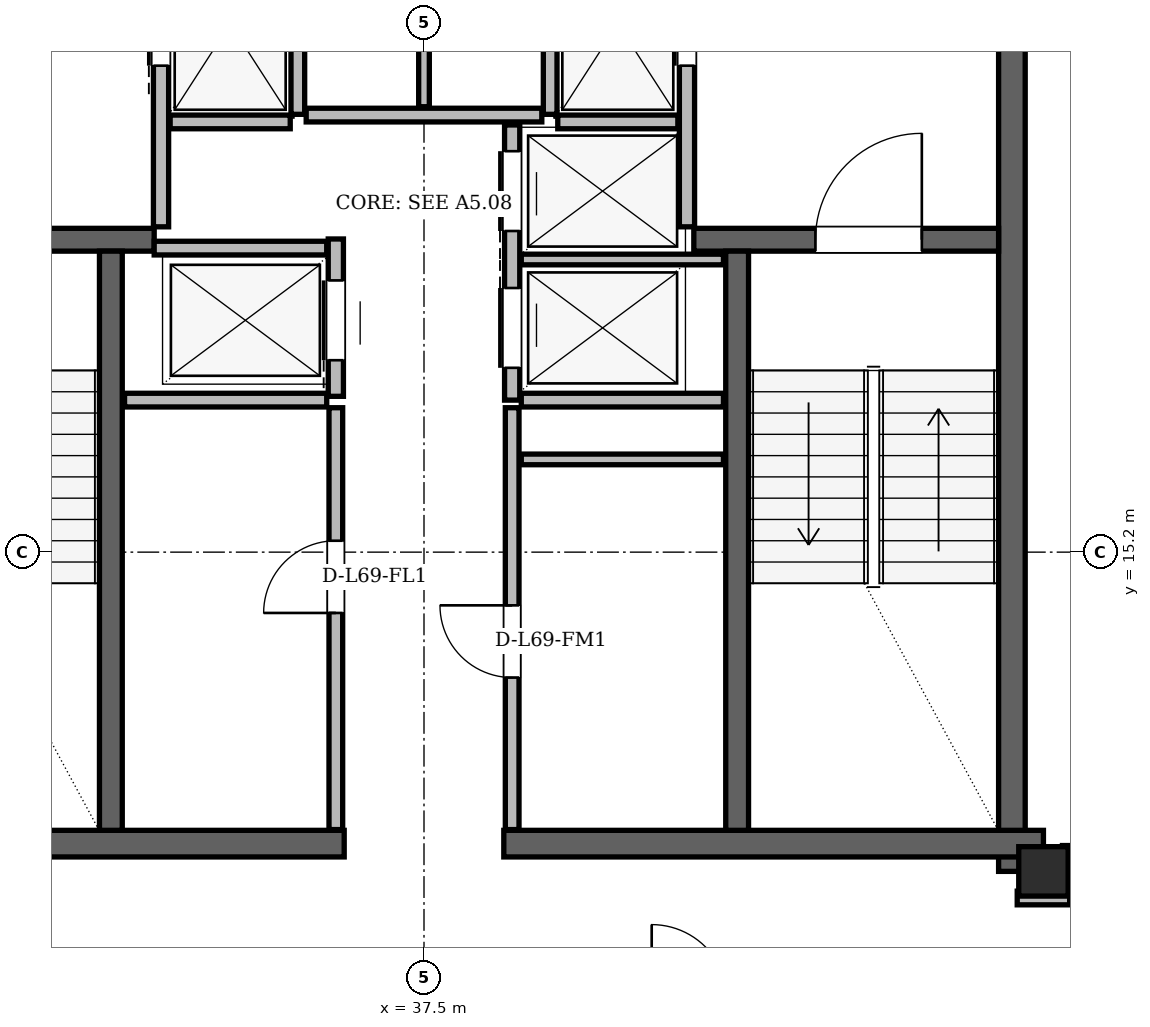
"""IFC4 building model, lengths in metres.
Left out: names, types, materials, properties, quantities, classifications, styles, units other than length and angle.
Written with IfcOpenShell. Run it as: python <this file> out.ifc"""

import sys

from ifc_helpers import new_model, si_unit, direction, frame, frame_2d, origin, origin_2d, place, context, subcontext, project, spatial, rectangle, hollow_rectangle, extrude, element, fill, save


model = new_model("IFC4")
c1 = context("Model", 3, precision=1e-05, world=origin(), true_north=direction((0.0, 1.0)))
c2 = subcontext(c1, "Body", "Model", "MODEL_VIEW")
j1 = project(units=[si_unit("LENGTHUNIT", "METRE"), si_unit("PLANEANGLEUNIT", "RADIAN")], contexts=[c1])
p1 = place(None, origin())
s1 = spatial("IfcSite", under=j1, at=p1, CompositionType="ELEMENT")
p2 = place(p1, origin())
s2 = spatial("IfcBuilding", under=s1, at=p2, CompositionType="ELEMENT")
p3 = place(p2, frame((0.0, 0.0, 261.6)))
s3 = spatial("IfcBuildingStorey", under=s2, at=p3, CompositionType="ELEMENT", Elevation=261.6)
p4 = place(p3, frame((45.65, 11.0, 0.0), z_axis=(0.0, 0.0, 1.0), x_axis=(1.0, 0.0, 0.0)))
e1 = element("IfcColumn", 1, at=p4, inside=s3, PredefinedType="COLUMN", context=c2, shape_type="SweptSolid", body=[
    extrude(hollow_rectangle(XDim=0.65, YDim=0.65, WallThickness=0.05, at=origin_2d()), origin(), (0.0, 0.0, 1.0), 3.9),
])
p5 = place(p3, frame((45.235, 11.0, 0.0), z_axis=(0.0, 0.0, 1.0), x_axis=(0.0, 1.0, 0.0)))
e2 = element("IfcWall", 2, at=p5, inside=s3, PredefinedType="SHEAR", context=c2, shape_type="SweptSolid", body=[
    extrude(rectangle(XDim=13.3, YDim=0.35, at=frame_2d((6.65, 0.0))), origin(), (0.0, 0.0, 1.0), 3.68),
])
for number, where, z_axis, x_axis in (
    (3, (29.35, 11.365, 0.0), (0.0, 0.0, 1.0), (1.0, 0.0, 0.0)),
    (4, (38.55, 11.365, 0.0), (0.0, 0.0, 1.0), (1.0, 0.0, 0.0)),
):
    element("IfcWall", number, at=place(p3, frame(where, z_axis=z_axis, x_axis=x_axis)), inside=s3, PredefinedType="SHEAR", context=c2, shape_type="SweptSolid", body=[
        extrude(rectangle(XDim=7.1, YDim=0.35, at=frame_2d((3.55, 0.0))), origin(), (0.0, 0.0, 1.0), 3.68),
    ])
p6 = place(p3, frame((29.94, 19.31, 0.0), z_axis=(0.0, 0.0, 1.0), x_axis=(1.0, 0.0, 0.0)))
e5 = element("IfcWall", 5, at=p6, inside=s3, PredefinedType="SHEAR", context=c2, shape_type="SweptSolid", body=[
    extrude(rectangle(XDim=4.01, YDim=0.3, at=frame_2d((2.005, 0.0))), origin(), (0.0, 0.0, 1.0), 3.68),
])
p7 = place(p6, frame((1.01, 0.0, 0.0)))
e6 = element("IfcOpeningElement", 6, at=p7, cuts=e5, PredefinedType="OPENING", context=c2, shape_type="SweptSolid", body=[
    extrude(rectangle(XDim=1.4, YDim=2.2, at=frame_2d((0.7, 1.1))), frame((0.0, 0.15, 0.0), z_axis=(0.0, -1.0, 0.0), x_axis=(1.0, 0.0, 0.0)), (0.0, 0.0, 1.0), 0.3),
])
p8 = place(p3, frame((41.05, 19.31, 0.0), z_axis=(0.0, 0.0, 1.0), x_axis=(1.0, 0.0, 0.0)))
e7 = element("IfcWall", 7, at=p8, inside=s3, PredefinedType="SHEAR", context=c2, shape_type="SweptSolid", body=[
    extrude(rectangle(XDim=4.01, YDim=0.3, at=frame_2d((2.005, 0.0))), origin(), (0.0, 0.0, 1.0), 3.68),
])
p9 = place(p8, frame((1.6, 0.0, 0.0)))
e8 = element("IfcOpeningElement", 8, at=p9, cuts=e7, PredefinedType="OPENING", context=c2, shape_type="SweptSolid", body=[
    extrude(rectangle(XDim=1.4, YDim=2.2, at=frame_2d((0.7, 1.1))), frame((0.0, 0.15, 0.0), z_axis=(0.0, -1.0, 0.0), x_axis=(1.0, 0.0, 0.0)), (0.0, 0.0, 1.0), 0.3),
])
for number, where, z_axis, x_axis in (
    (9, (33.38, 11.54, 0.0), (0.0, 0.0, 1.0), (0.0, 1.0, 0.0)),
    (10, (41.62, 11.54, 0.0), (0.0, 0.0, 1.0), (0.0, 1.0, 0.0)),
):
    element("IfcWall", number, at=place(p3, frame(where, z_axis=z_axis, x_axis=x_axis)), inside=s3, PredefinedType="SHEAR", context=c2, shape_type="SweptSolid", body=[
        extrude(rectangle(XDim=7.62, YDim=0.3, at=frame_2d((3.81, 0.0))), origin(), (0.0, 0.0, 1.0), 3.68),
    ])
p10 = place(p3, frame((58.652, 10.835, 0.0), z_axis=(0.0, 0.0, 1.0), x_axis=(-0.500002906693, 0.866023725598, 0.0)))
e11 = element("IfcWall", 11, at=p10, inside=s3, PredefinedType="SOLIDWALL", context=c2, shape_type="SweptSolid", body=[
    extrude(rectangle(XDim=37.2, YDim=0.29, at=frame_2d((18.6, 0.0))), origin(), (0.0, 0.0, 1.0), 3.058),
])
p11 = place(p10, frame((6.774, 0.0, 0.0)))
e12 = element("IfcOpeningElement", 12, at=p11, cuts=e11, PredefinedType="OPENING", context=c2, shape_type="SweptSolid", body=[
    extrude(rectangle(XDim=1.5, YDim=2.2, at=frame_2d((0.75, 1.1))), frame((0.0, 0.145, 0.0), z_axis=(0.0, -1.0, 0.0), x_axis=(1.0, 0.0, 0.0)), (0.0, 0.0, 1.0), 0.29),
])
p12 = place(p10, frame((32.061, 0.0, 0.0)))
e13 = element("IfcOpeningElement", 13, at=p12, cuts=e11, PredefinedType="OPENING", context=c2, shape_type="SweptSolid", body=[
    extrude(rectangle(XDim=1.5, YDim=2.2, at=frame_2d((0.75, 1.1))), frame((0.0, 0.145, 0.0), z_axis=(0.0, -1.0, 0.0), x_axis=(1.0, 0.0, 0.0)), (0.0, 0.0, 1.0), 0.29),
])
p13 = place(p10, frame((12.689, 0.0, 0.85)))
e14 = element("IfcOpeningElement", 14, at=p13, cuts=e11, PredefinedType="OPENING", context=c2, shape_type="SweptSolid", body=[
    extrude(rectangle(XDim=1.6, YDim=1.7, at=frame_2d((0.8, 0.85))), frame((0.0, 0.145, 0.0), z_axis=(0.0, -1.0, 0.0), x_axis=(1.0, 0.0, 0.0)), (0.0, 0.0, 1.0), 0.29),
])
p14 = place(p10, frame((16.599, 0.0, 0.85)))
e15 = element("IfcOpeningElement", 15, at=p14, cuts=e11, PredefinedType="OPENING", context=c2, shape_type="SweptSolid", body=[
    extrude(rectangle(XDim=3.0, YDim=2.098, at=frame_2d((1.5, 1.049))), frame((0.0, 0.145, 0.0), z_axis=(0.0, -1.0, 0.0), x_axis=(1.0, 0.0, 0.0)), (0.0, 0.0, 1.0), 0.29),
])
p15 = place(p10, frame((1.24, 0.0, 0.85)))
e16 = element("IfcOpeningElement", 16, at=p15, cuts=e11, PredefinedType="OPENING", context=c2, shape_type="SweptSolid", body=[
    extrude(rectangle(XDim=1.2, YDim=1.48, at=frame_2d((0.6, 0.74))), frame((0.0, 0.145, 0.0), z_axis=(0.0, -1.0, 0.0), x_axis=(1.0, 0.0, 0.0)), (0.0, 0.0, 1.0), 0.29),
])
p16 = place(p10, frame((3.566, 0.0, 0.85)))
e17 = element("IfcOpeningElement", 17, at=p16, cuts=e11, PredefinedType="OPENING", context=c2, shape_type="SweptSolid", body=[
    extrude(rectangle(XDim=1.2, YDim=1.48, at=frame_2d((0.6, 0.74))), frame((0.0, 0.145, 0.0), z_axis=(0.0, -1.0, 0.0), x_axis=(1.0, 0.0, 0.0)), (0.0, 0.0, 1.0), 0.29),
])
p17 = place(p10, frame((22.917, 0.0, 0.85)))
e18 = element("IfcOpeningElement", 18, at=p17, cuts=e11, PredefinedType="OPENING", context=c2, shape_type="SweptSolid", body=[
    extrude(rectangle(XDim=1.6, YDim=1.7, at=frame_2d((0.8, 0.85))), frame((0.0, 0.145, 0.0), z_axis=(0.0, -1.0, 0.0), x_axis=(1.0, 0.0, 0.0)), (0.0, 0.0, 1.0), 0.29),
])
p18 = place(p10, frame((27.025, 0.0, 0.85)))
e19 = element("IfcOpeningElement", 19, at=p18, cuts=e11, PredefinedType="OPENING", context=c2, shape_type="SweptSolid", body=[
    extrude(rectangle(XDim=3.0, YDim=2.098, at=frame_2d((1.5, 1.049))), frame((0.0, 0.145, 0.0), z_axis=(0.0, -1.0, 0.0), x_axis=(1.0, 0.0, 0.0)), (0.0, 0.0, 1.0), 0.29),
])
p19 = place(p10, frame((34.508, 0.0, 0.85)))
e20 = element("IfcOpeningElement", 20, at=p19, cuts=e11, PredefinedType="OPENING", context=c2, shape_type="SweptSolid", body=[
    extrude(rectangle(XDim=1.2, YDim=1.48, at=frame_2d((0.6, 0.74))), frame((0.0, 0.145, 0.0), z_axis=(0.0, -1.0, 0.0), x_axis=(1.0, 0.0, 0.0)), (0.0, 0.0, 1.0), 0.29),
])
p20 = place(p3, frame((34.948, 43.051, 0.0), z_axis=(0.0, 0.0, 1.0), x_axis=(-0.500002906693, -0.866023725598, 0.0)))
e21 = element("IfcWall", 21, at=p20, inside=s3, PredefinedType="SOLIDWALL", context=c2, shape_type="SweptSolid", body=[
    extrude(rectangle(XDim=37.2, YDim=0.29, at=frame_2d((18.6, 0.0))), origin(), (0.0, 0.0, 1.0), 3.058),
])
p21 = place(p20, frame((8.034, 0.0, 0.0)))
e22 = element("IfcOpeningElement", 22, at=p21, cuts=e21, PredefinedType="OPENING", context=c2, shape_type="SweptSolid", body=[
    extrude(rectangle(XDim=1.5, YDim=2.2, at=frame_2d((0.75, 1.1))), frame((0.0, 0.145, 0.0), z_axis=(0.0, -1.0, 0.0), x_axis=(1.0, 0.0, 0.0)), (0.0, 0.0, 1.0), 0.29),
])
p22 = place(p20, frame((32.061, 0.0, 0.0)))
e23 = element("IfcOpeningElement", 23, at=p22, cuts=e21, PredefinedType="OPENING", context=c2, shape_type="SweptSolid", body=[
    extrude(rectangle(XDim=1.5, YDim=2.2, at=frame_2d((0.75, 1.1))), frame((0.0, 0.145, 0.0), z_axis=(0.0, -1.0, 0.0), x_axis=(1.0, 0.0, 0.0)), (0.0, 0.0, 1.0), 0.29),
])
p23 = place(p20, frame((35.104, 0.0, 0.85)))
e24 = element("IfcOpeningElement", 24, at=p23, cuts=e21, PredefinedType="OPENING", context=c2, shape_type="SweptSolid", body=[
    extrude(rectangle(XDim=1.2, YDim=1.48, at=frame_2d((0.6, 0.74))), frame((0.0, 0.145, 0.0), z_axis=(0.0, -1.0, 0.0), x_axis=(1.0, 0.0, 0.0)), (0.0, 0.0, 1.0), 0.29),
])
p24 = place(p20, frame((12.597, 0.0, 0.85)))
e25 = element("IfcOpeningElement", 25, at=p24, cuts=e21, PredefinedType="OPENING", context=c2, shape_type="SweptSolid", body=[
    extrude(rectangle(XDim=2.0, YDim=1.8, at=frame_2d((1.0, 0.9))), frame((0.0, 0.145, 0.0), z_axis=(0.0, -1.0, 0.0), x_axis=(1.0, 0.0, 0.0)), (0.0, 0.0, 1.0), 0.29),
])
p25 = place(p20, frame((20.995, 0.0, 0.85)))
e26 = element("IfcOpeningElement", 26, at=p25, cuts=e21, PredefinedType="OPENING", context=c2, shape_type="SweptSolid", body=[
    extrude(rectangle(XDim=1.4, YDim=1.6, at=frame_2d((0.7, 0.8))), frame((0.0, 0.145, 0.0), z_axis=(0.0, -1.0, 0.0), x_axis=(1.0, 0.0, 0.0)), (0.0, 0.0, 1.0), 0.29),
])
p26 = place(p20, frame((27.454, 0.0, 0.85)))
e27 = element("IfcOpeningElement", 27, at=p26, cuts=e21, PredefinedType="OPENING", context=c2, shape_type="SweptSolid", body=[
    extrude(rectangle(XDim=1.2, YDim=1.48, at=frame_2d((0.6, 0.74))), frame((0.0, 0.145, 0.0), z_axis=(0.0, -1.0, 0.0), x_axis=(1.0, 0.0, 0.0)), (0.0, 0.0, 1.0), 0.29),
])
p27 = place(p20, frame((2.415, 0.0, 0.85)))
e28 = element("IfcOpeningElement", 28, at=p27, cuts=e21, PredefinedType="OPENING", context=c2, shape_type="SweptSolid", body=[
    extrude(rectangle(XDim=2.6, YDim=1.95, at=frame_2d((1.3, 0.975))), frame((0.0, 0.145, 0.0), z_axis=(0.0, -1.0, 0.0), x_axis=(1.0, 0.0, 0.0)), (0.0, 0.0, 1.0), 0.29),
])
p28 = place(p3, frame((34.04, 19.48, 0.0), z_axis=(0.0, 0.0, 1.0), x_axis=(0.0, 1.0, 0.0)))
e29 = element("IfcWall", 29, at=p28, inside=s3, PredefinedType="PARTITIONING", context=c2, shape_type="SweptSolid", body=[
    extrude(rectangle(XDim=4.5, YDim=0.2, at=frame_2d((2.25, 0.0))), origin(), (0.0, 0.0, 1.0), 3.68),
])
p29 = place(p28, frame((2.12, 0.0, 0.0)))
e30 = element("IfcOpeningElement", 30, at=p29, cuts=e29, PredefinedType="OPENING", context=c2, shape_type="SweptSolid", body=[
    extrude(rectangle(XDim=1.1, YDim=2.2, at=frame_2d((0.55, 1.1))), frame((0.0, 0.1, 0.0), z_axis=(0.0, -1.0, 0.0), x_axis=(1.0, 0.0, 0.0)), (0.0, 0.0, 1.0), 0.2),
])
p30 = place(p3, frame((35.84, 20.96, 0.0), z_axis=(0.0, 0.0, 1.0), x_axis=(0.0, 1.0, 0.0)))
e31 = element("IfcWall", 31, at=p30, inside=s3, PredefinedType="PARTITIONING", context=c2, shape_type="SweptSolid", body=[
    extrude(rectangle(XDim=3.02, YDim=0.18, at=frame_2d((1.51, 0.0))), origin(), (0.0, 0.0, 1.0), 3.68),
])
p31 = place(p3, frame((34.16, 20.86, 0.0), z_axis=(0.0, 0.0, 1.0), x_axis=(1.0, 0.0, 0.0)))
e32 = element("IfcWall", 32, at=p31, inside=s3, PredefinedType="PARTITIONING", context=c2, shape_type="SweptSolid", body=[
    extrude(rectangle(XDim=1.58, YDim=0.18, at=frame_2d((0.79, 0.0))), origin(), (0.0, 0.0, 1.0), 3.68),
])
p32 = place(p3, frame((40.96, 19.48, 0.0), z_axis=(0.0, 0.0, 1.0), x_axis=(0.0, 1.0, 0.0)))
e33 = element("IfcWall", 33, at=p32, inside=s3, PredefinedType="PARTITIONING", context=c2, shape_type="SweptSolid", body=[
    extrude(rectangle(XDim=4.5, YDim=0.2, at=frame_2d((2.25, 0.0))), origin(), (0.0, 0.0, 1.0), 3.68),
])
p33 = place(p32, frame((2.12, 0.0, 0.0)))
e34 = element("IfcOpeningElement", 34, at=p33, cuts=e33, PredefinedType="OPENING", context=c2, shape_type="SweptSolid", body=[
    extrude(rectangle(XDim=1.1, YDim=2.2, at=frame_2d((0.55, 1.1))), frame((0.0, 0.1, 0.0), z_axis=(0.0, -1.0, 0.0), x_axis=(1.0, 0.0, 0.0)), (0.0, 0.0, 1.0), 0.2),
])
p34 = place(p3, frame((39.16, 20.96, 0.0), z_axis=(0.0, 0.0, 1.0), x_axis=(0.0, 1.0, 0.0)))
e35 = element("IfcWall", 35, at=p34, inside=s3, PredefinedType="PARTITIONING", context=c2, shape_type="SweptSolid", body=[
    extrude(rectangle(XDim=3.02, YDim=0.18, at=frame_2d((1.51, 0.0))), origin(), (0.0, 0.0, 1.0), 3.68),
])
p35 = place(p3, frame((39.26, 20.86, 0.0), z_axis=(0.0, 0.0, 1.0), x_axis=(1.0, 0.0, 0.0)))
e36 = element("IfcWall", 36, at=p35, inside=s3, PredefinedType="PARTITIONING", context=c2, shape_type="SweptSolid", body=[
    extrude(rectangle(XDim=1.58, YDim=0.18, at=frame_2d((0.79, 0.0))), origin(), (0.0, 0.0, 1.0), 3.68),
])
p36 = place(p3, frame((36.34, 17.25, 0.0), z_axis=(0.0, 0.0, 1.0), x_axis=(0.0, 1.0, 0.0)))
e37 = element("IfcWall", 37, at=p36, inside=s3, PredefinedType="PARTITIONING", context=c2, shape_type="SweptSolid", body=[
    extrude(rectangle(XDim=2.07, YDim=0.2, at=frame_2d((1.035, 0.0))), origin(), (0.0, 0.0, 1.0), 3.68),
])
p37 = place(p36, frame((0.475, 0.0, 0.0)))
e38 = element("IfcOpeningElement", 38, at=p37, cuts=e37, PredefinedType="OPENING", context=c2, shape_type="SweptSolid", body=[
    extrude(rectangle(XDim=1.05, YDim=2.15, at=frame_2d((0.525, 1.075))), frame((0.0, 0.1, 0.0), z_axis=(0.0, -1.0, 0.0), x_axis=(1.0, 0.0, 0.0)), (0.0, 0.0, 1.0), 0.2),
])
p38 = place(p3, frame((33.95, 19.2, 0.0), z_axis=(0.0, 0.0, 1.0), x_axis=(1.0, 0.0, 0.0)))
e39 = element("IfcWall", 39, at=p38, inside=s3, PredefinedType="PARTITIONING", context=c2, shape_type="SweptSolid", body=[
    extrude(rectangle(XDim=2.27, YDim=0.18, at=frame_2d((1.135, 0.0))), origin(), (0.0, 0.0, 1.0), 3.68),
])
p39 = place(p3, frame((33.56, 17.2, 0.0), z_axis=(0.0, 0.0, 1.0), x_axis=(1.0, 0.0, 0.0)))
e40 = element("IfcWall", 40, at=p39, inside=s3, PredefinedType="PARTITIONING", context=c2, shape_type="SweptSolid", body=[
    extrude(rectangle(XDim=2.66, YDim=0.18, at=frame_2d((1.33, 0.0))), origin(), (0.0, 0.0, 1.0), 3.68),
])
p40 = place(p3, frame((36.34, 11.55, 0.0), z_axis=(0.0, 0.0, 1.0), x_axis=(0.0, 1.0, 0.0)))
e41 = element("IfcWall", 41, at=p40, inside=s3, PredefinedType="PARTITIONING", context=c2, shape_type="SweptSolid", body=[
    extrude(rectangle(XDim=5.55, YDim=0.18, at=frame_2d((2.775, 0.0))), origin(), (0.0, 0.0, 1.0), 3.68),
])
p41 = place(p40, frame((2.85, 0.0, 0.0)))
e42 = element("IfcOpeningElement", 42, at=p41, cuts=e41, PredefinedType="OPENING", context=c2, shape_type="SweptSolid", body=[
    extrude(rectangle(XDim=0.95, YDim=2.1, at=frame_2d((0.475, 1.05))), frame((0.0, 0.09, 0.0), z_axis=(0.0, -1.0, 0.0), x_axis=(1.0, 0.0, 0.0)), (0.0, 0.0, 1.0), 0.18),
])
p42 = place(p3, frame((38.66, 17.2, 0.0), z_axis=(0.0, 0.0, 1.0), x_axis=(0.0, 1.0, 0.0)))
e43 = element("IfcWall", 43, at=p42, inside=s3, PredefinedType="PARTITIONING", context=c2, shape_type="SweptSolid", body=[
    extrude(rectangle(XDim=3.62, YDim=0.2, at=frame_2d((1.81, 0.0))), origin(), (0.0, 0.0, 1.0), 3.68),
])
p43 = place(p42, frame((0.425, 0.0, 0.0)))
e44 = element("IfcOpeningElement", 44, at=p43, cuts=e43, PredefinedType="OPENING", context=c2, shape_type="SweptSolid", body=[
    extrude(rectangle(XDim=1.05, YDim=2.15, at=frame_2d((0.525, 1.075))), frame((0.0, 0.1, 0.0), z_axis=(0.0, -1.0, 0.0), x_axis=(1.0, 0.0, 0.0)), (0.0, 0.0, 1.0), 0.2),
])
p44 = place(p42, frame((2.225, 0.0, 0.0)))
e45 = element("IfcOpeningElement", 45, at=p44, cuts=e43, PredefinedType="OPENING", context=c2, shape_type="SweptSolid", body=[
    extrude(rectangle(XDim=1.05, YDim=2.15, at=frame_2d((0.525, 1.075))), frame((0.0, 0.1, 0.0), z_axis=(0.0, -1.0, 0.0), x_axis=(1.0, 0.0, 0.0)), (0.0, 0.0, 1.0), 0.2),
])
p45 = place(p3, frame((38.78, 17.2, 0.0), z_axis=(0.0, 0.0, 1.0), x_axis=(1.0, 0.0, 0.0)))
e46 = element("IfcWall", 46, at=p45, inside=s3, PredefinedType="PARTITIONING", context=c2, shape_type="SweptSolid", body=[
    extrude(rectangle(XDim=2.66, YDim=0.18, at=frame_2d((1.33, 0.0))), origin(), (0.0, 0.0, 1.0), 3.68),
])
p46 = place(p3, frame((38.78, 19.05, 0.0), z_axis=(0.0, 0.0, 1.0), x_axis=(1.0, 0.0, 0.0)))
e47 = element("IfcWall", 47, at=p46, inside=s3, PredefinedType="PARTITIONING", context=c2, shape_type="SweptSolid", body=[
    extrude(rectangle(XDim=2.66, YDim=0.14, at=frame_2d((1.33, 0.0))), origin(), (0.0, 0.0, 1.0), 3.68),
])
p47 = place(p3, frame((38.66, 11.55, 0.0), z_axis=(0.0, 0.0, 1.0), x_axis=(0.0, 1.0, 0.0)))
e48 = element("IfcWall", 48, at=p47, inside=s3, PredefinedType="PARTITIONING", context=c2, shape_type="SweptSolid", body=[
    extrude(rectangle(XDim=5.55, YDim=0.18, at=frame_2d((2.775, 0.0))), origin(), (0.0, 0.0, 1.0), 3.68),
])
p48 = place(p47, frame((2.0, 0.0, 0.0)))
e49 = element("IfcOpeningElement", 49, at=p48, cuts=e48, PredefinedType="OPENING", context=c2, shape_type="SweptSolid", body=[
    extrude(rectangle(XDim=0.95, YDim=2.1, at=frame_2d((0.475, 1.05))), frame((0.0, 0.09, 0.0), z_axis=(0.0, -1.0, 0.0), x_axis=(1.0, 0.0, 0.0)), (0.0, 0.0, 1.0), 0.18),
])
p49 = place(p3, frame((38.78, 16.42, 0.0), z_axis=(0.0, 0.0, 1.0), x_axis=(1.0, 0.0, 0.0)))
e50 = element("IfcWall", 50, at=p49, inside=s3, PredefinedType="PARTITIONING", context=c2, shape_type="SweptSolid", body=[
    extrude(rectangle(XDim=2.66, YDim=0.14, at=frame_2d((1.33, 0.0))), origin(), (0.0, 0.0, 1.0), 3.68),
])
p50 = place(p3, frame((35.95, 20.95, 0.0), z_axis=(0.0, 0.0, 1.0), x_axis=(1.0, 0.0, 0.0)))
e51 = element("IfcWall", 51, at=p50, inside=s3, PredefinedType="PARTITIONING", context=c2, shape_type="SweptSolid", body=[
    extrude(rectangle(XDim=3.1, YDim=0.18, at=frame_2d((1.55, 0.0))), origin(), (0.0, 0.0, 1.0), 3.68),
])
p51 = place(p3, frame((37.5, 21.06, 0.0), z_axis=(0.0, 0.0, 1.0), x_axis=(0.0, 1.0, 0.0)))
e52 = element("IfcWall", 52, at=p51, inside=s3, PredefinedType="PARTITIONING", context=c2, shape_type="SweptSolid", body=[
    extrude(rectangle(XDim=2.92, YDim=0.14, at=frame_2d((1.46, 0.0))), origin(), (0.0, 0.0, 1.0), 3.68),
])
p52 = place(p3, frame((45.305, 10.65, 0.0), z_axis=(0.0, 0.0, 1.0), x_axis=(1.0, 0.0, 0.0)))
e53 = element("IfcWall", 53, at=p52, inside=s3, PredefinedType="PARTITIONING", context=c2, shape_type="SweptSolid", body=[
    extrude(rectangle(XDim=0.69, YDim=0.18, at=frame_2d((0.345, 0.0))), origin(), (0.0, 0.0, 1.0), 3.68),
])
p53 = place(p3, frame((45.99, 10.95, 0.0), z_axis=(0.0, 0.0, 1.0), x_axis=(0.0, 1.0, 0.0)))
e54 = element("IfcWall", 54, at=p53, inside=s3, PredefinedType="PARTITIONING", context=c2, shape_type="SweptSolid", body=[
    extrude(rectangle(XDim=0.39, YDim=0.18, at=frame_2d((0.195, 0.0))), origin(), (0.0, 0.0, 1.0), 3.68),
])
p54 = place(p41, origin())
e55 = element("IfcDoor", 55, at=p54, inside=s3, OperationType="SINGLE_SWING_LEFT", PredefinedType="DOOR", context=c2, shape_type="SweptSolid", body=[
    extrude(rectangle(XDim=0.95, YDim=2.1, at=frame_2d((0.475, 1.05))), frame((0.0, 0.025, 0.0), z_axis=(0.0, -1.0, 0.0), x_axis=(1.0, 0.0, 0.0)), (0.0, 0.0, 1.0), 0.05),
])
fill(e42, e55)
p55 = place(p48, origin())
e56 = element("IfcDoor", 56, at=p55, inside=s3, OperationType="SINGLE_SWING_RIGHT", PredefinedType="DOOR", context=c2, shape_type="SweptSolid", body=[
    extrude(rectangle(XDim=0.95, YDim=2.1, at=frame_2d((0.475, 1.05))), frame((0.0, 0.025, 0.0), z_axis=(0.0, -1.0, 0.0), x_axis=(1.0, 0.0, 0.0)), (0.0, 0.0, 1.0), 0.05),
])
fill(e49, e56)
p56 = place(p29, origin())
e57 = element("IfcDoor", 57, at=p56, inside=s3, OperationType="SLIDING_TO_LEFT", PredefinedType="DOOR", context=c2, shape_type="SweptSolid", body=[
    extrude(rectangle(XDim=1.1, YDim=2.2, at=frame_2d((0.55, 1.1))), frame((0.0, 0.025, 0.0), z_axis=(0.0, -1.0, 0.0), x_axis=(1.0, 0.0, 0.0)), (0.0, 0.0, 1.0), 0.05),
])
fill(e30, e57)
p57 = place(p33, origin())
e58 = element("IfcDoor", 58, at=p57, inside=s3, OperationType="SLIDING_TO_RIGHT", PredefinedType="DOOR", context=c2, shape_type="SweptSolid", body=[
    extrude(rectangle(XDim=1.1, YDim=2.2, at=frame_2d((0.55, 1.1))), frame((0.0, 0.025, 0.0), z_axis=(0.0, -1.0, 0.0), x_axis=(1.0, 0.0, 0.0)), (0.0, 0.0, 1.0), 0.05),
])
fill(e34, e58)
p58 = place(p37, origin())
e59 = element("IfcDoor", 59, at=p58, inside=s3, OperationType="SLIDING_TO_LEFT", PredefinedType="DOOR", context=c2, shape_type="SweptSolid", body=[
    extrude(rectangle(XDim=1.05, YDim=2.15, at=frame_2d((0.525, 1.075))), frame((0.0, 0.025, 0.0), z_axis=(0.0, -1.0, 0.0), x_axis=(1.0, 0.0, 0.0)), (0.0, 0.0, 1.0), 0.05),
])
fill(e38, e59)
p59 = place(p43, origin())
e60 = element("IfcDoor", 60, at=p59, inside=s3, OperationType="SLIDING_TO_RIGHT", PredefinedType="DOOR", context=c2, shape_type="SweptSolid", body=[
    extrude(rectangle(XDim=1.05, YDim=2.15, at=frame_2d((0.525, 1.075))), frame((0.0, 0.025, 0.0), z_axis=(0.0, -1.0, 0.0), x_axis=(1.0, 0.0, 0.0)), (0.0, 0.0, 1.0), 0.05),
])
fill(e44, e60)
p60 = place(p44, origin())
e61 = element("IfcDoor", 61, at=p60, inside=s3, OperationType="SLIDING_TO_LEFT", PredefinedType="DOOR", context=c2, shape_type="SweptSolid", body=[
    extrude(rectangle(XDim=1.05, YDim=2.15, at=frame_2d((0.525, 1.075))), frame((0.0, 0.025, 0.0), z_axis=(0.0, -1.0, 0.0), x_axis=(1.0, 0.0, 0.0)), (0.0, 0.0, 1.0), 0.05),
])
fill(e45, e61)
p61 = place(p9, origin())
e62 = element("IfcDoor", 62, at=p61, inside=s3, OperationType="SINGLE_SWING_RIGHT", PredefinedType="DOOR", context=c2, shape_type="SweptSolid", body=[
    extrude(rectangle(XDim=1.4, YDim=2.2, at=frame_2d((0.7, 1.1))), frame((0.0, 0.025, 0.0), z_axis=(0.0, -1.0, 0.0), x_axis=(1.0, 0.0, 0.0)), (0.0, 0.0, 1.0), 0.05),
])
fill(e8, e62)
save(model, sys.argv[1])
